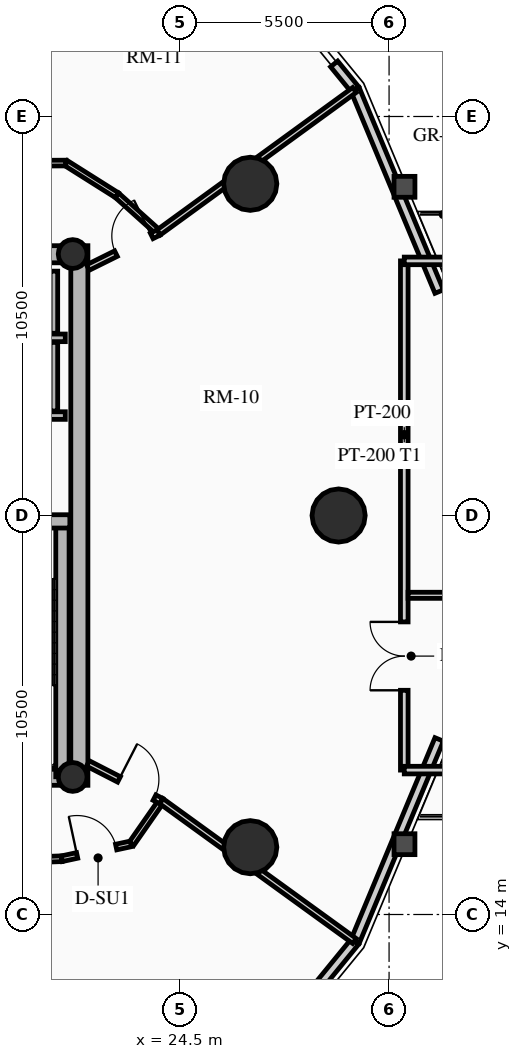
"""IFC4 building model, lengths in metres.
Left out: names, types, materials, properties, quantities, classifications, styles, units other than length and angle.
Written with IfcOpenShell. Run it as: python <this file> out.ifc"""

import sys

from ifc_helpers import new_model, si_unit, direction, frame, frame_2d, origin, origin_2d, place, context, subcontext, project, spatial, rectangle, circle, hollow_circle, extrude, source, transform, mapped, element, fill, save


model = new_model("IFC4")
c1 = context("Model", 3, precision=1e-05, world=origin(), true_north=direction((0.0, 1.0)))
c2 = subcontext(c1, "Body", "Model", "MODEL_VIEW")
j1 = project(units=[si_unit("LENGTHUNIT", "METRE"), si_unit("PLANEANGLEUNIT", "RADIAN")], contexts=[c1])
p1 = place(None, origin())
s1 = spatial("IfcSite", under=j1, at=p1, CompositionType="ELEMENT")
p2 = place(p1, origin())
s2 = spatial("IfcBuilding", under=s1, at=p2, CompositionType="ELEMENT")
p3 = place(p2, frame((0.0, 0.0, 132.88)))
s3 = spatial("IfcBuildingStorey", under=s2, at=p3, CompositionType="ELEMENT", Elevation=132.88)
p4 = place(p3, frame((21.85, 17.4, 0.0), z_axis=(0.0, 0.0, 1.0), x_axis=(0.0, 1.0, 0.0)))
e1 = element("IfcWall", 1, at=p4, inside=s3, PredefinedType="SHEAR", context=c2, shape_type="SweptSolid", body=[
    extrude(rectangle(XDim=14.2, YDim=0.45, at=frame_2d((7.1, 0.0))), origin(), (0.0, 0.0, 1.0), 3.72),
])
p5 = place(p3, frame((11.15, 17.625, 0.0), z_axis=(0.0, 0.0, 1.0), x_axis=(1.0, 0.0, 0.0)))
e2 = element("IfcWall", 2, at=p5, inside=s3, PredefinedType="SHEAR", context=c2, shape_type="SweptSolid", body=[
    extrude(rectangle(XDim=10.7, YDim=0.45, at=frame_2d((5.35, 0.0))), origin(), (0.0, 0.0, 1.0), 3.72),
])
m1 = source(origin(), c2, "Body", "SweptSolid", [
    extrude(rectangle(XDim=1.5, YDim=2.02, at=frame_2d((0.75, 1.01))), frame((0.0, 0.235, 0.0), z_axis=(0.0, -1.0, 0.0), x_axis=(1.0, 0.0, 0.0)), (0.0, 0.0, 1.0), 0.47),
])
p6 = place(p5, frame((5.45, 0.0, 0.0)))
e3 = element("IfcOpeningElement", 3, at=p6, cuts=e2, PredefinedType="OPENING", context=c2, shape_type="MappedRepresentation", body=[
    mapped(m1, transform((0.0, 0.0, 0.0), x_axis=(1.0, 0.0, 0.0), y_axis=(0.0, 1.0, 0.0), z_axis=(0.0, 0.0, 1.0), scale=1.0)),
])
p7 = place(p3, frame((11.15, 31.375, 0.0), z_axis=(0.0, 0.0, 1.0), x_axis=(1.0, 0.0, 0.0)))
e4 = element("IfcWall", 4, at=p7, inside=s3, PredefinedType="SHEAR", context=c2, shape_type="SweptSolid", body=[
    extrude(rectangle(XDim=10.7, YDim=0.45, at=frame_2d((5.35, 0.0))), origin(), (0.0, 0.0, 1.0), 3.72),
])
p8 = place(p7, frame((4.6, 0.0, 0.0)))
e5 = element("IfcOpeningElement", 5, at=p8, cuts=e4, PredefinedType="OPENING", context=c2, shape_type="MappedRepresentation", body=[
    mapped(m1, transform((0.0, 0.0, 0.0), x_axis=(1.0, 0.0, 0.0), y_axis=(0.0, 1.0, 0.0), z_axis=(0.0, 0.0, 1.0), scale=1.0)),
])
p9 = place(p3, frame((21.405, 17.625, 0.0), z_axis=(0.0, 0.0, 1.0), x_axis=(0.0, 1.0, 0.0)))
e6 = element("IfcWall", 6, at=p9, inside=s3, PredefinedType="SHEAR", context=c2, shape_type="SweptSolid", body=[
    extrude(rectangle(XDim=6.72, YDim=0.35, at=frame_2d((3.36, 0.0))), origin(), (0.0, 0.0, 1.0), 3.72),
])
p10 = place(p3, frame((18.315, 24.345, 0.0), z_axis=(0.0, 0.0, 1.0), x_axis=(1.0, 0.0, 0.0)))
e7 = element("IfcWall", 7, at=p10, inside=s3, PredefinedType="SHEAR", context=c2, shape_type="SweptSolid", body=[
    extrude(rectangle(XDim=3.285, YDim=0.35, at=frame_2d((1.643, 0.0))), origin(), (0.0, 0.0, 1.0), 3.72),
])
for number, where, z_axis, x_axis in (
    (8, (21.675, 17.62, 0.0), (0.0, 0.0, 1.0), (1.0, 0.0, 0.0)),
    (9, (21.675, 31.38, 0.0), (0.0, 0.0, 1.0), (1.0, 0.0, 0.0)),
):
    element("IfcColumn", number, at=place(p3, frame(where, z_axis=z_axis, x_axis=x_axis)), inside=s3, PredefinedType="COLUMN", context=c2, shape_type="SweptSolid", body=[
        extrude(hollow_circle(Radius=0.38, WallThickness=0.032, at=origin_2d()), origin(), (0.0, 0.0, 1.0), 3.72),
    ])
for number, where, z_axis, x_axis in (
    (10, (28.672, 24.5, 0.0), (0.0, 0.0, 1.0), (1.0, 0.0, 0.0)),
    (11, (26.347, 33.229, 0.0), (0.0, 0.0, 1.0), (1.0, 0.0, 0.0)),
    (12, (26.347, 15.771, 0.0), (0.0, 0.0, 1.0), (1.0, 0.0, 0.0)),
):
    element("IfcColumn", number, at=place(p3, frame(where, z_axis=z_axis, x_axis=x_axis)), inside=s3, PredefinedType="USERDEFINED", context=c2, shape_type="SweptSolid", body=[
        extrude(circle(Radius=0.7, at=origin_2d()), origin(), (0.0, 0.0, 1.0), 3.72),
    ])
p11 = place(p3, frame((29.105, 35.709, 0.0), z_axis=(0.0, 0.0, 1.0), x_axis=(0.384344417632, -0.923189779317, 0.0)))
e13 = element("IfcWall", 13, at=p11, inside=s3, PredefinedType="SOLIDWALL", context=c2, shape_type="SweptSolid", body=[
    extrude(rectangle(XDim=5.758, YDim=0.24, at=frame_2d((2.879, 0.0))), origin(), (0.0, 0.0, 1.0), 2.949),
])
p12 = place(p3, frame((28.555, 36.383, 0.0), z_axis=(0.0, 0.0, 1.0), x_axis=(0.632702874536, -0.774394649099, 0.0)))
e14 = element("IfcWall", 14, at=p12, inside=s3, PredefinedType="SOLIDWALL", context=c2, shape_type="SweptSolid", body=[
    extrude(rectangle(XDim=0.87, YDim=0.24, at=frame_2d((0.435, 0.0))), origin(), (0.0, 0.0, 1.0), 2.949),
])
p13 = place(p3, frame((29.105, 13.291, 0.0), z_axis=(0.0, 0.0, 1.0), x_axis=(-0.632700781152, -0.77439635945, 0.0)))
e15 = element("IfcWall", 15, at=p13, inside=s3, PredefinedType="SOLIDWALL", context=c2, shape_type="SweptSolid", body=[
    extrude(rectangle(XDim=5.448, YDim=0.24, at=frame_2d((2.724, 0.0))), origin(), (0.0, 0.0, 1.0), 2.949),
])
m2 = source(origin(), c2, "Body", "SweptSolid", [
    extrude(rectangle(XDim=1.9, YDim=1.35, at=frame_2d((0.95, 0.675))), frame((0.0, 0.13, 0.0), z_axis=(0.0, -1.0, 0.0), x_axis=(1.0, 0.0, 0.0)), (0.0, 0.0, 1.0), 0.26),
])
p14 = place(p13, frame((1.774, 0.0, 0.65)))
e16 = element("IfcOpeningElement", 16, at=p14, cuts=e15, PredefinedType="OPENING", context=c2, shape_type="MappedRepresentation", body=[
    mapped(m2, transform((0.0, 0.0, 0.0), x_axis=(1.0, 0.0, 0.0), y_axis=(0.0, 1.0, 0.0), z_axis=(0.0, 0.0, 1.0), scale=1.0)),
])
p15 = place(p3, frame((31.318, 18.607, 0.0), z_axis=(0.0, 0.0, 1.0), x_axis=(-0.384344417632, -0.923189779317, 0.0)))
e17 = element("IfcWall", 17, at=p15, inside=s3, PredefinedType="SOLIDWALL", context=c2, shape_type="SweptSolid", body=[
    extrude(rectangle(XDim=5.758, YDim=0.24, at=frame_2d((2.879, 0.0))), origin(), (0.0, 0.0, 1.0), 2.949),
])
for number, where, z_axis, x_axis in (
    (18, (18.51, 27.13, 0.0), (0.0, 0.0, 1.0), (1.0, 0.0, 0.0)),
    (19, (18.51, 29.175, 0.0), (0.0, 0.0, 1.0), (1.0, 0.0, 0.0)),
):
    element("IfcWall", number, at=place(p3, frame(where, z_axis=z_axis, x_axis=x_axis)), inside=s3, PredefinedType="SHEAR", context=c2, shape_type="SweptSolid", body=[
        extrude(rectangle(XDim=2.97, YDim=0.2, at=frame_2d((1.485, 0.0))), origin(), (0.0, 0.0, 1.0), 3.72),
    ])
p16 = place(p3, frame((21.18, 27.25, 0.0), z_axis=(0.0, 0.0, 1.0), x_axis=(0.0, 1.0, 0.0)))
e20 = element("IfcWall", 20, at=p16, inside=s3, PredefinedType="SHEAR", context=c2, shape_type="SweptSolid", body=[
    extrude(rectangle(XDim=1.805, YDim=0.2, at=frame_2d((0.902, 0.0))), origin(), (0.0, 0.0, 1.0), 3.72),
])
p17 = place(p3, frame((21.18, 29.295, 0.0), z_axis=(0.0, 0.0, 1.0), x_axis=(0.0, 1.0, 0.0)))
e21 = element("IfcWall", 21, at=p17, inside=s3, PredefinedType="SHEAR", context=c2, shape_type="SweptSolid", body=[
    extrude(rectangle(XDim=1.635, YDim=0.2, at=frame_2d((0.817, 0.0))), origin(), (0.0, 0.0, 1.0), 3.72),
])
p18 = place(p3, frame((30.4, 17.8, 0.0), z_axis=(0.0, 0.0, 1.0), x_axis=(0.0, 1.0, 0.0)))
e22 = element("IfcWall", 22, at=p18, inside=s3, PredefinedType="PARTITIONING", context=c2, shape_type="SweptSolid", body=[
    extrude(rectangle(XDim=13.4, YDim=0.2, at=frame_2d((6.7, 0.0))), origin(), (0.0, 0.0, 1.0), 2.949),
])
m3 = source(origin(), c2, "Body", "SweptSolid", [
    extrude(rectangle(XDim=1.8, YDim=2.05, at=frame_2d((0.9, 1.025))), frame((0.0, 0.11, 0.0), z_axis=(0.0, -1.0, 0.0), x_axis=(1.0, 0.0, 0.0)), (0.0, 0.0, 1.0), 0.22),
])
p19 = place(p18, frame((2.1, 0.0, 0.0)))
e23 = element("IfcOpeningElement", 23, at=p19, cuts=e22, PredefinedType="OPENING", context=c2, shape_type="MappedRepresentation", body=[
    mapped(m3, transform((0.0, 0.0, 0.0), x_axis=(1.0, 0.0, 0.0), y_axis=(0.0, 1.0, 0.0), z_axis=(0.0, 0.0, 1.0), scale=1.0)),
])
for number, where, z_axis, x_axis in (
    (24, (30.4, 31.2, 0.0), (0.0, 0.0, 1.0), (1.0, 0.0, 0.0)),
    (25, (30.4, 17.8, 0.0), (0.0, 0.0, 1.0), (1.0, 0.0, 0.0)),
):
    element("IfcWall", number, at=place(p3, frame(where, z_axis=z_axis, x_axis=x_axis)), inside=s3, PredefinedType="PARTITIONING", context=c2, shape_type="SweptSolid", body=[
        extrude(rectangle(XDim=1.95, YDim=0.2, at=frame_2d((0.975, 0.0))), origin(), (0.0, 0.0, 1.0), 2.949),
    ])
p20 = place(p3, frame((30.5, 22.4, 0.0), z_axis=(0.0, 0.0, 1.0), x_axis=(1.0, 0.0, 0.0)))
e26 = element("IfcWall", 26, at=p20, inside=s3, PredefinedType="PARTITIONING", context=c2, shape_type="SweptSolid", body=[
    extrude(rectangle(XDim=11.35, YDim=0.16, at=frame_2d((5.675, 0.0))), origin(), (0.0, 0.0, 1.0), 2.712),
])
m4 = source(origin(), c2, "Body", "SweptSolid", [
    extrude(rectangle(XDim=1.5, YDim=2.02, at=frame_2d((0.75, 1.01))), frame((0.0, 0.09, 0.0), z_axis=(0.0, -1.0, 0.0), x_axis=(1.0, 0.0, 0.0)), (0.0, 0.0, 1.0), 0.18),
])
p21 = place(p20, frame((4.9, 0.0, 0.0)))
e27 = element("IfcOpeningElement", 27, at=p21, cuts=e26, PredefinedType="OPENING", context=c2, shape_type="MappedRepresentation", body=[
    mapped(m4, transform((0.0, 0.0, 0.0), x_axis=(1.0, 0.0, 0.0), y_axis=(0.0, 1.0, 0.0), z_axis=(0.0, 0.0, 1.0), scale=1.0)),
])
p22 = place(p3, frame((23.933, 31.946, 0.0), z_axis=(0.0, 0.0, 1.0), x_axis=(-0.744529651383, 0.667589393423, 0.0)))
e28 = element("IfcWall", 28, at=p22, inside=s3, PredefinedType="PARTITIONING", context=c2, shape_type="SweptSolid", body=[
    extrude(rectangle(XDim=1.472, YDim=0.15, at=frame_2d((0.736, 0.0))), origin(), (0.0, 0.0, 1.0), 2.995),
])
p23 = place(p3, frame((22.837, 32.929, 0.0), z_axis=(0.0, 0.0, 1.0), x_axis=(-0.84581079329, 0.533482991252, 0.0)))
e29 = element("IfcWall", 29, at=p23, inside=s3, PredefinedType="PARTITIONING", context=c2, shape_type="SweptSolid", body=[
    extrude(rectangle(XDim=1.585, YDim=0.15, at=frame_2d((0.792, 0.0))), origin(), (0.0, 0.0, 1.0), 2.995),
])
p24 = place(p3, frame((21.496, 33.775, 0.0), z_axis=(0.0, 0.0, 1.0), x_axis=(-0.999989544737, -0.004572790979, 0.0)))
e30 = element("IfcWall", 30, at=p24, inside=s3, PredefinedType="PARTITIONING", context=c2, shape_type="SweptSolid", body=[
    extrude(rectangle(XDim=3.364, YDim=0.15, at=frame_2d((1.682, 0.0))), origin(), (0.0, 0.0, 1.0), 2.995),
])
m5 = source(origin(), c2, "Body", "SweptSolid", [
    extrude(rectangle(XDim=1.05, YDim=2.015, at=frame_2d((0.525, 1.007))), frame((0.0, 0.085, 0.0), z_axis=(0.0, -1.0, 0.0), x_axis=(1.0, 0.0, 0.0)), (0.0, 0.0, 1.0), 0.17),
])
p25 = place(p24, frame((1.546, 0.0, 0.0)))
e31 = element("IfcOpeningElement", 31, at=p25, cuts=e30, PredefinedType="OPENING", context=c2, shape_type="MappedRepresentation", body=[
    mapped(m5, transform((0.0, 0.0, 0.0), x_axis=(1.0, 0.0, 0.0), y_axis=(0.0, 1.0, 0.0), z_axis=(0.0, 0.0, 1.0), scale=1.0)),
])
p26 = place(p3, frame((14.792, 15.24, 0.0), z_axis=(0.0, 0.0, 1.0), x_axis=(0.999408106202, 0.034401122909, 0.0)))
e32 = element("IfcWall", 32, at=p26, inside=s3, PredefinedType="PARTITIONING", context=c2, shape_type="SweptSolid", body=[
    extrude(rectangle(XDim=6.6, YDim=0.15, at=frame_2d((3.3, 0.0))), origin(), (0.0, 0.0, 1.0), 2.995),
])
p27 = place(p3, frame((21.388, 15.468, 0.0), z_axis=(0.0, 0.0, 1.0), x_axis=(0.977672748596, 0.210133283069, 0.0)))
e33 = element("IfcWall", 33, at=p27, inside=s3, PredefinedType="PARTITIONING", context=c2, shape_type="SweptSolid", body=[
    extrude(rectangle(XDim=1.876, YDim=0.15, at=frame_2d((0.938, 0.0))), origin(), (0.0, 0.0, 1.0), 2.995),
])
p28 = place(p27, frame((0.413, 0.0, 0.0)))
e34 = element("IfcOpeningElement", 34, at=p28, cuts=e33, PredefinedType="OPENING", context=c2, shape_type="MappedRepresentation", body=[
    mapped(m5, transform((0.0, 0.0, 0.0), x_axis=(1.0, 0.0, 0.0), y_axis=(0.0, 1.0, 0.0), z_axis=(0.0, 0.0, 1.0), scale=1.0)),
])
p29 = place(p3, frame((23.222, 15.862, 0.0), z_axis=(0.0, 0.0, 1.0), x_axis=(0.571941738195, 0.820294244836, 0.0)))
e35 = element("IfcWall", 35, at=p29, inside=s3, PredefinedType="PARTITIONING", context=c2, shape_type="SweptSolid", body=[
    extrude(rectangle(XDim=1.369, YDim=0.15, at=frame_2d((0.685, 0.0))), origin(), (0.0, 0.0, 1.0), 2.995),
])
p30 = place(p3, frame((23.933, 31.946, 0.0), z_axis=(0.0, 0.0, 1.0), x_axis=(0.808636722237, 0.588308296261, 0.0)))
e36 = element("IfcWall", 36, at=p30, inside=s3, PredefinedType="PARTITIONING", context=c2, shape_type="SweptSolid", body=[
    extrude(rectangle(XDim=6.376, YDim=0.16, at=frame_2d((3.188, 0.0))), origin(), (0.0, 0.0, 1.0), 2.949),
])
p31 = place(p3, frame((24.006, 16.985, 0.0), z_axis=(0.0, 0.0, 1.0), x_axis=(0.809849730791, -0.586637378231, 0.0)))
e37 = element("IfcWall", 37, at=p31, inside=s3, PredefinedType="PARTITIONING", context=c2, shape_type="SweptSolid", body=[
    extrude(rectangle(XDim=6.277, YDim=0.16, at=frame_2d((3.139, 0.0))), origin(), (0.0, 0.0, 1.0), 2.949),
])
p32 = place(p3, frame((22.075, 31.025, 0.0), z_axis=(0.0, 0.0, 1.0), x_axis=(0.8959286695, 0.444197950432, 0.0)))
e38 = element("IfcWall", 38, at=p32, inside=s3, PredefinedType="PARTITIONING", context=c2, shape_type="SweptSolid", body=[
    extrude(rectangle(XDim=2.074, YDim=0.16, at=frame_2d((1.037, 0.0))), origin(), (0.0, 0.0, 1.0), 2.995),
])
m6 = source(origin(), c2, "Body", "SweptSolid", [
    extrude(rectangle(XDim=1.05, YDim=2.015, at=frame_2d((0.525, 1.007))), frame((0.0, 0.09, 0.0), z_axis=(0.0, -1.0, 0.0), x_axis=(1.0, 0.0, 0.0)), (0.0, 0.0, 1.0), 0.18),
])
p33 = place(p32, frame((0.824, 0.0, 0.0)))
e39 = element("IfcOpeningElement", 39, at=p33, cuts=e38, PredefinedType="OPENING", context=c2, shape_type="MappedRepresentation", body=[
    mapped(m6, transform((0.0, 0.0, 0.0), x_axis=(1.0, 0.0, 0.0), y_axis=(0.0, 1.0, 0.0), z_axis=(0.0, 0.0, 1.0), scale=1.0)),
])
p34 = place(p3, frame((22.075, 17.975, 0.0), z_axis=(0.0, 0.0, 1.0), x_axis=(0.889835034782, -0.456282380632, 0.0)))
e40 = element("IfcWall", 40, at=p34, inside=s3, PredefinedType="PARTITIONING", context=c2, shape_type="SweptSolid", body=[
    extrude(rectangle(XDim=2.17, YDim=0.16, at=frame_2d((1.085, 0.0))), origin(), (0.0, 0.0, 1.0), 2.995),
])
p35 = place(p34, frame((0.92, 0.0, 0.0)))
e41 = element("IfcOpeningElement", 41, at=p35, cuts=e40, PredefinedType="OPENING", context=c2, shape_type="MappedRepresentation", body=[
    mapped(m6, transform((0.0, 0.0, 0.0), x_axis=(1.0, 0.0, 0.0), y_axis=(0.0, 1.0, 0.0), z_axis=(0.0, 0.0, 1.0), scale=1.0)),
])
m7 = source(origin(), c2, "Body", "SweptSolid", [
    extrude(rectangle(XDim=1.8, YDim=2.05, at=frame_2d((0.9, 1.025))), frame((0.0, 0.025, 0.0), z_axis=(0.0, -1.0, 0.0), x_axis=(1.0, 0.0, 0.0)), (0.0, 0.0, 1.0), 0.05),
])
p36 = place(p19, origin())
e42 = element("IfcDoor", 42, at=p36, inside=s3, OperationType="DOUBLE_DOOR_SINGLE_SWING", PredefinedType="DOOR", context=c2, shape_type="MappedRepresentation", body=[
    mapped(m7, transform((0.0, 0.0, 0.0), x_axis=(1.0, 0.0, 0.0), y_axis=(0.0, 1.0, 0.0), z_axis=(0.0, 0.0, 1.0), scale=1.0)),
])
fill(e23, e42)
m8 = source(origin(), c2, "Body", "SweptSolid", [
    extrude(rectangle(XDim=1.05, YDim=2.015, at=frame_2d((0.525, 1.007))), frame((0.0, 0.025, 0.0), z_axis=(0.0, -1.0, 0.0), x_axis=(1.0, 0.0, 0.0)), (0.0, 0.0, 1.0), 0.05),
])
p37 = place(p33, origin())
e43 = element("IfcDoor", 43, at=p37, inside=s3, OperationType="SINGLE_SWING_RIGHT", PredefinedType="DOOR", context=c2, shape_type="MappedRepresentation", body=[
    mapped(m8, transform((0.0, 0.0, 0.0), x_axis=(1.0, 0.0, 0.0), y_axis=(0.0, 1.0, 0.0), z_axis=(0.0, 0.0, 1.0), scale=1.0)),
])
fill(e39, e43)
p38 = place(p35, origin())
e44 = element("IfcDoor", 44, at=p38, inside=s3, OperationType="SINGLE_SWING_LEFT", PredefinedType="DOOR", context=c2, shape_type="MappedRepresentation", body=[
    mapped(m8, transform((0.0, 0.0, 0.0), x_axis=(1.0, 0.0, 0.0), y_axis=(0.0, 1.0, 0.0), z_axis=(0.0, 0.0, 1.0), scale=1.0)),
])
fill(e41, e44)
p39 = place(p28, origin())
e45 = element("IfcDoor", 45, at=p39, inside=s3, OperationType="SINGLE_SWING_LEFT", PredefinedType="DOOR", context=c2, shape_type="MappedRepresentation", body=[
    mapped(m8, transform((0.0, 0.0, 0.0), x_axis=(1.0, 0.0, 0.0), y_axis=(0.0, 1.0, 0.0), z_axis=(0.0, 0.0, 1.0), scale=1.0)),
])
fill(e34, e45)
save(model, sys.argv[1])
